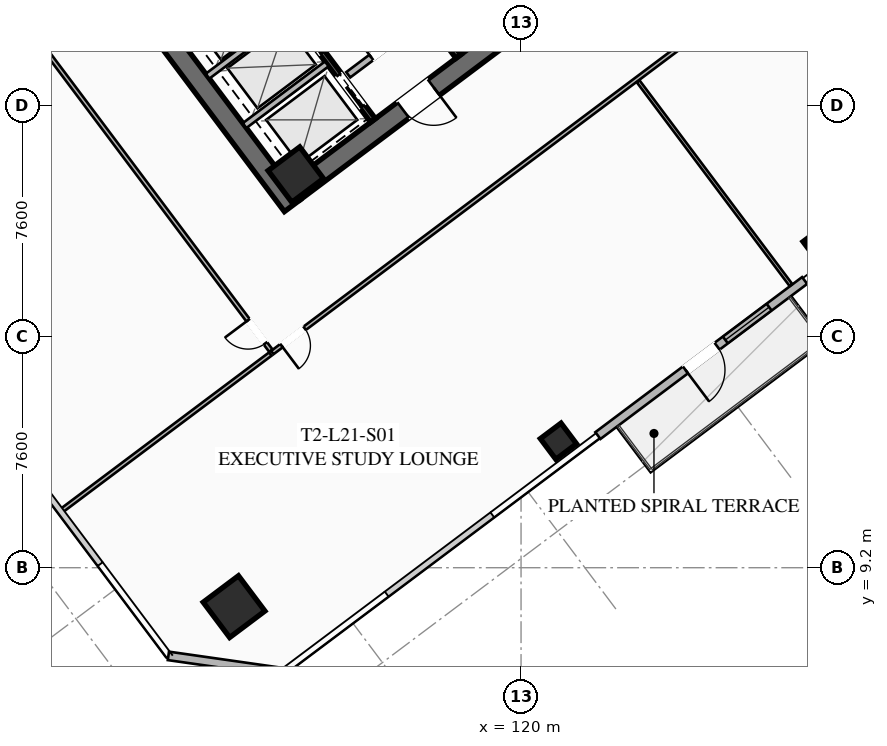
"""IFC4 building model, lengths in metres.
Left out: names, types, materials, properties, quantities, classifications, styles, units other than length and angle.
Written with IfcOpenShell. Run it as: python <this file> out.ifc"""

import sys

from ifc_helpers import new_model, si_unit, direction, frame, frame_2d, origin, origin_2d, place, context, subcontext, project, spatial, rectangle, hollow_rectangle, extrude, element, fill, save


model = new_model("IFC4")
c1 = context("Model", 3, precision=1e-05, world=origin(), true_north=direction((0.0, 1.0)))
c2 = subcontext(c1, "Body", "Model", "MODEL_VIEW")
j1 = project(units=[si_unit("LENGTHUNIT", "METRE"), si_unit("PLANEANGLEUNIT", "RADIAN")], contexts=[c1])
p1 = place(None, origin())
s1 = spatial("IfcSite", under=j1, at=p1, CompositionType="ELEMENT")
p2 = place(p1, origin())
s2 = spatial("IfcBuilding", under=s1, at=p2, CompositionType="ELEMENT")
p3 = place(p2, frame((0.0, 0.0, 81.4)))
s3 = spatial("IfcBuildingStorey", under=s2, at=p3, CompositionType="ELEMENT", Elevation=81.4)
p4 = place(p3, frame((112.476, 21.107, 0.0), z_axis=(0.0, 0.0, 1.0), x_axis=(-0.600005007985, 0.799996243986, 0.0)))
e1 = element("IfcWall", 1, at=p4, inside=s3, PredefinedType="SHEAR", context=c2, shape_type="SweptSolid", body=[
    extrude(rectangle(XDim=15.6, YDim=0.65, at=frame_2d((7.8, 0.0))), origin(), (0.0, 0.0, 1.0), 3.55),
])
p5 = place(p3, frame((124.429, 30.478, 0.0), z_axis=(0.0, 0.0, 1.0), x_axis=(-0.799998028465, -0.600002628705, 0.0)))
e2 = element("IfcWall", 2, at=p5, inside=s3, PredefinedType="SHEAR", context=c2, shape_type="SweptSolid", body=[
    extrude(rectangle(XDim=14.86, YDim=0.65, at=frame_2d((7.43, 0.0))), origin(), (0.0, 0.0, 1.0), 3.55),
])
p6 = place(p5, frame((9.13, 0.0, 0.0)))
e3 = element("IfcOpeningElement", 3, at=p6, cuts=e2, PredefinedType="OPENING", context=c2, shape_type="SweptSolid", body=[
    extrude(rectangle(XDim=1.25, YDim=2.25, at=frame_2d((0.625, 1.125))), frame((0.0, 0.335, 0.0), z_axis=(0.0, -1.0, 0.0), x_axis=(1.0, 0.0, 0.0)), (0.0, 0.0, 1.0), 0.67),
])
p7 = place(p5, frame((4.08, 0.0, 0.0)))
e4 = element("IfcOpeningElement", 4, at=p7, cuts=e2, PredefinedType="OPENING", context=c2, shape_type="SweptSolid", body=[
    extrude(rectangle(XDim=1.25, YDim=2.25, at=frame_2d((0.625, 1.125))), frame((0.0, 0.335, 0.0), z_axis=(0.0, -1.0, 0.0), x_axis=(1.0, 0.0, 0.0)), (0.0, 0.0, 1.0), 0.67),
])
p8 = place(p3, frame((112.59, 22.13, 0.0), z_axis=(0.0, 0.0, 1.0), x_axis=(0.799999996291, 0.600000004945, 0.0)))
e5 = element("IfcColumn", 5, at=p8, inside=s3, PredefinedType="COLUMN", context=c2, shape_type="SweptSolid", body=[
    extrude(hollow_rectangle(XDim=1.3, YDim=1.3, WallThickness=0.05, at=origin_2d()), origin(), (0.0, 0.0, 1.0), 3.35),
])
p9 = place(p3, frame((110.56, 7.92, 0.0), z_axis=(0.0, 0.0, 1.0), x_axis=(0.799999996291, 0.600000004945, 0.0)))
e6 = element("IfcColumn", 6, at=p9, inside=s3, PredefinedType="COLUMN", context=c2, shape_type="SweptSolid", body=[
    extrude(hollow_rectangle(XDim=1.45, YDim=1.45, WallThickness=0.055, at=origin_2d()), origin(), (0.0, 0.0, 1.0), 3.35),
])
for number, where, z_axis, x_axis in (
    (7, (121.23, 13.36, 0.0), (0.0, 0.0, 1.0), (0.8, 0.6, 0.0)),
    (8, (129.87, 19.84, 0.0), (0.0, 0.0, 1.0), (0.8, 0.6, 0.0)),
):
    element("IfcColumn", number, at=place(p3, frame(where, z_axis=z_axis, x_axis=x_axis)), inside=s3, PredefinedType="COLUMN", context=c2, shape_type="SweptSolid", body=[
        extrude(hollow_rectangle(XDim=0.85, YDim=0.85, WallThickness=0.035, at=origin_2d()), origin(), (0.0, 0.0, 1.0), 3.35),
    ])
p10 = place(p3, frame((129.328, 18.646, 0.0), z_axis=(0.0, 0.0, 1.0), x_axis=(-0.799986212866, -0.600018382406, 0.0)))
e9 = element("IfcWall", 9, at=p10, inside=s3, PredefinedType="SOLIDWALL", context=c2, shape_type="SweptSolid", body=[
    extrude(rectangle(XDim=8.5, YDim=0.28, at=frame_2d((4.25, 0.0))), origin(), (0.0, 0.0, 1.0), 3.35),
])
p11 = place(p10, frame((3.6, 0.0, 0.0)))
e10 = element("IfcOpeningElement", 10, at=p11, cuts=e9, PredefinedType="OPENING", context=c2, shape_type="SweptSolid", body=[
    extrude(rectangle(XDim=1.3, YDim=2.15, at=frame_2d((0.65, 1.075))), frame((0.0, 0.15, 0.0), z_axis=(0.0, -1.0, 0.0), x_axis=(1.0, 0.0, 0.0)), (0.0, 0.0, 1.0), 0.3),
])
p12 = place(p10, frame((1.46, 0.0, 0.85)))
e11 = element("IfcOpeningElement", 11, at=p12, cuts=e9, PredefinedType="OPENING", context=c2, shape_type="SweptSolid", body=[
    extrude(rectangle(XDim=1.8, YDim=1.92, at=frame_2d((0.9, 0.96))), frame((0.0, 0.15, 0.0), z_axis=(0.0, -1.0, 0.0), x_axis=(1.0, 0.0, 0.0)), (0.0, 0.0, 1.0), 0.3),
])
p13 = place(p3, frame((112.18, 5.76, 0.0), z_axis=(0.0, 0.0, 1.0), x_axis=(-0.989948214866, 0.141430307517, 0.0)))
e12 = element("IfcWall", 12, at=p13, inside=s3, PredefinedType="SOLIDWALL", context=c2, shape_type="SweptSolid", body=[
    extrude(rectangle(XDim=3.818, YDim=0.28, at=frame_2d((1.909, 0.0))), origin(), (0.0, 0.0, 1.0), 3.35),
])
p14 = place(p3, frame((117.938, 26.016, 0.0), z_axis=(0.0, 0.0, 1.0), x_axis=(-0.600005463273, 0.799995902516, 0.0)))
e13 = element("IfcWall", 13, at=p14, inside=s3, PredefinedType="SHEAR", context=c2, shape_type="SweptSolid", body=[
    extrude(rectangle(XDim=14.3, YDim=0.2, at=frame_2d((7.15, 0.0))), origin(), (0.0, 0.0, 1.0), 3.35),
])
p15 = place(p3, frame((114.316, 25.412, 0.0), z_axis=(0.0, 0.0, 1.0), x_axis=(0.800018601094, 0.59997519774, 0.0)))
e14 = element("IfcWall", 14, at=p15, inside=s3, PredefinedType="SOLIDWALL", context=c2, shape_type="SweptSolid", body=[
    extrude(rectangle(XDim=3.15, YDim=0.22, at=frame_2d((1.575, 0.0))), origin(), (0.0, 0.0, 1.0), 2.703),
])
p16 = place(p15, frame((0.95, 0.0, 0.0)))
e15 = element("IfcOpeningElement", 15, at=p16, cuts=e14, PredefinedType="OPENING", context=c2, shape_type="SweptSolid", body=[
    extrude(rectangle(XDim=1.25, YDim=2.25, at=frame_2d((0.625, 1.125))), frame((0.0, 0.12, 0.0), z_axis=(0.0, -1.0, 0.0), x_axis=(1.0, 0.0, 0.0)), (0.0, 0.0, 1.0), 0.24),
])
p17 = place(p3, frame((115.13, 23.91, 0.0), z_axis=(0.0, 0.0, 1.0), x_axis=(-0.599975393228, 0.800018454488, 0.0)))
e16 = element("IfcWall", 16, at=p17, inside=s3, PredefinedType="SHEAR", context=c2, shape_type="SweptSolid", body=[
    extrude(rectangle(XDim=6.35, YDim=0.2, at=frame_2d((3.175, 0.0))), origin(), (0.0, 0.0, 1.0), 3.35),
])
p18 = place(p17, frame((4.775, 0.0, 0.0)))
e17 = element("IfcOpeningElement", 17, at=p18, cuts=e16, PredefinedType="OPENING", context=c2, shape_type="SweptSolid", body=[
    extrude(rectangle(XDim=1.3, YDim=2.25, at=frame_2d((0.65, 1.125))), frame((0.0, 0.11, 0.0), z_axis=(0.0, -1.0, 0.0), x_axis=(1.0, 0.0, 0.0)), (0.0, 0.0, 1.0), 0.22),
])
p19 = place(p17, frame((2.775, 0.0, 0.0)))
e18 = element("IfcOpeningElement", 18, at=p19, cuts=e16, PredefinedType="OPENING", context=c2, shape_type="SweptSolid", body=[
    extrude(rectangle(XDim=1.3, YDim=2.25, at=frame_2d((0.65, 1.125))), frame((0.0, 0.11, 0.0), z_axis=(0.0, -1.0, 0.0), x_axis=(1.0, 0.0, 0.0)), (0.0, 0.0, 1.0), 0.22),
])
p20 = place(p17, frame((0.575, 0.0, 0.0)))
e19 = element("IfcOpeningElement", 19, at=p20, cuts=e16, PredefinedType="OPENING", context=c2, shape_type="SweptSolid", body=[
    extrude(rectangle(XDim=1.3, YDim=2.25, at=frame_2d((0.65, 1.125))), frame((0.0, 0.11, 0.0), z_axis=(0.0, -1.0, 0.0), x_axis=(1.0, 0.0, 0.0)), (0.0, 0.0, 1.0), 0.22),
])
for number, where, z_axis, x_axis in (
    (20, (110.906, 23.742, 0.0), (0.0, 0.0, 1.0), (0.8, 0.6, 0.0)),
    (21, (109.688, 25.366, 0.0), (0.0, 0.0, 1.0), (0.8, 0.6, 0.0)),
):
    element("IfcWall", number, at=place(p3, frame(where, z_axis=z_axis, x_axis=x_axis)), inside=s3, PredefinedType="SOLIDWALL", context=c2, shape_type="SweptSolid", body=[
        extrude(rectangle(XDim=3.38, YDim=0.2, at=frame_2d((1.69, 0.0))), origin(), (0.0, 0.0, 1.0), 3.35),
    ])
p21 = place(p3, frame((134.402, 33.214, 0.0), z_axis=(0.0, 0.0, 1.0), x_axis=(-0.799995848831, -0.600005534853, 0.0)))
e22 = element("IfcWall", 22, at=p21, inside=s3, PredefinedType="PARTITIONING", context=c2, shape_type="SweptSolid", body=[
    extrude(rectangle(XDim=28.23, YDim=0.135, at=frame_2d((14.115, 0.0))), origin(), (0.0, 0.0, 1.0), 2.703),
])
p22 = place(p21, frame((26.9, 0.0, 0.0)))
e23 = element("IfcOpeningElement", 23, at=p22, cuts=e22, PredefinedType="OPENING", context=c2, shape_type="SweptSolid", body=[
    extrude(rectangle(XDim=0.95, YDim=2.05, at=frame_2d((0.475, 1.025))), frame((0.0, 0.077, 0.0), z_axis=(0.0, -1.0, 0.0), x_axis=(1.0, 0.0, 0.0)), (0.0, 0.0, 1.0), 0.155),
])
p23 = place(p21, frame((0.38, 0.0, 0.0)))
e24 = element("IfcOpeningElement", 24, at=p23, cuts=e22, PredefinedType="OPENING", context=c2, shape_type="SweptSolid", body=[
    extrude(rectangle(XDim=0.95, YDim=2.05, at=frame_2d((0.475, 1.025))), frame((0.0, 0.077, 0.0), z_axis=(0.0, -1.0, 0.0), x_axis=(1.0, 0.0, 0.0)), (0.0, 0.0, 1.0), 0.155),
])
p24 = place(p3, frame((128.878, 18.496, 0.0), z_axis=(0.0, 0.0, 1.0), x_axis=(-0.599995338474, 0.800003496123, 0.0)))
e25 = element("IfcWall", 25, at=p24, inside=s3, PredefinedType="PARTITIONING", context=c2, shape_type="SweptSolid", body=[
    extrude(rectangle(XDim=8.38, YDim=0.11, at=frame_2d((4.19, 0.0))), origin(), (0.0, 0.0, 1.0), 2.703),
])
p25 = place(p3, frame((111.77, 16.34, 0.0), z_axis=(0.0, 0.0, 1.0), x_axis=(-0.600003549523, 0.799997337845, 0.0)))
e26 = element("IfcWall", 26, at=p25, inside=s3, PredefinedType="PARTITIONING", context=c2, shape_type="SweptSolid", body=[
    extrude(rectangle(XDim=22.01, YDim=0.135, at=frame_2d((11.005, 0.0))), origin(), (0.0, 0.0, 1.0), 2.703),
])
p26 = place(p25, frame((0.3, 0.0, 0.0)))
e27 = element("IfcOpeningElement", 27, at=p26, cuts=e26, PredefinedType="OPENING", context=c2, shape_type="SweptSolid", body=[
    extrude(rectangle(XDim=0.95, YDim=2.05, at=frame_2d((0.475, 1.025))), frame((0.0, 0.077, 0.0), z_axis=(0.0, -1.0, 0.0), x_axis=(1.0, 0.0, 0.0)), (0.0, 0.0, 1.0), 0.155),
])
p27 = place(p3, frame((104.858, 11.056, 0.0), z_axis=(0.0, 0.0, 1.0), x_axis=(0.799993202584, 0.600009063115, 0.0)))
e28 = element("IfcWall", 28, at=p27, inside=s3, PredefinedType="PARTITIONING", context=c2, shape_type="SweptSolid", body=[
    extrude(rectangle(XDim=8.62, YDim=0.135, at=frame_2d((4.31, 0.0))), origin(), (0.0, 0.0, 1.0), 2.703),
])
p28 = place(p11, origin())
e29 = element("IfcDoor", 29, at=p28, inside=s3, OperationType="SINGLE_SWING_RIGHT", PredefinedType="DOOR", context=c2, shape_type="SweptSolid", body=[
    extrude(rectangle(XDim=1.3, YDim=2.15, at=frame_2d((0.65, 1.075))), frame((0.0, 0.025, 0.0), z_axis=(0.0, -1.0, 0.0), x_axis=(1.0, 0.0, 0.0)), (0.0, 0.0, 1.0), 0.05),
])
fill(e10, e29)
p29 = place(p12, origin())
e30 = element("IfcWindow", 30, at=p29, inside=s3, PartitioningType="SINGLE_PANEL", PredefinedType="WINDOW", context=c2, shape_type="SweptSolid", body=[
    extrude(rectangle(XDim=1.8, YDim=1.92, at=frame_2d((0.9, 0.96))), frame((0.0, 0.03, 0.0), z_axis=(0.0, -1.0, 0.0), x_axis=(1.0, 0.0, 0.0)), (0.0, 0.0, 1.0), 0.06),
])
fill(e11, e30)
p30 = place(p6, origin())
e31 = element("IfcDoor", 31, at=p30, inside=s3, OperationType="SINGLE_SWING_LEFT", PredefinedType="DOOR", context=c2, shape_type="SweptSolid", body=[
    extrude(rectangle(XDim=1.25, YDim=2.25, at=frame_2d((0.625, 1.125))), frame((0.0, 0.025, 0.0), z_axis=(0.0, -1.0, 0.0), x_axis=(1.0, 0.0, 0.0)), (0.0, 0.0, 1.0), 0.05),
])
fill(e3, e31)
p31 = place(p16, origin())
e32 = element("IfcDoor", 32, at=p31, inside=s3, OperationType="SINGLE_SWING_LEFT", PredefinedType="DOOR", context=c2, shape_type="SweptSolid", body=[
    extrude(rectangle(XDim=1.25, YDim=2.25, at=frame_2d((0.625, 1.125))), frame((0.0, 0.025, 0.0), z_axis=(0.0, -1.0, 0.0), x_axis=(1.0, 0.0, 0.0)), (0.0, 0.0, 1.0), 0.05),
])
fill(e15, e32)
p32 = place(p22, origin())
e33 = element("IfcDoor", 33, at=p32, inside=s3, OperationType="SINGLE_SWING_RIGHT", PredefinedType="DOOR", context=c2, shape_type="SweptSolid", body=[
    extrude(rectangle(XDim=0.95, YDim=2.05, at=frame_2d((0.475, 1.025))), frame((0.0, 0.025, 0.0), z_axis=(0.0, -1.0, 0.0), x_axis=(1.0, 0.0, 0.0)), (0.0, 0.0, 1.0), 0.05),
])
fill(e23, e33)
p33 = place(p26, origin())
e34 = element("IfcDoor", 34, at=p33, inside=s3, OperationType="SINGLE_SWING_RIGHT", PredefinedType="DOOR", context=c2, shape_type="SweptSolid", body=[
    extrude(rectangle(XDim=0.95, YDim=2.05, at=frame_2d((0.475, 1.025))), frame((0.0, 0.025, 0.0), z_axis=(0.0, -1.0, 0.0), x_axis=(1.0, 0.0, 0.0)), (0.0, 0.0, 1.0), 0.05),
])
fill(e27, e34)
p34 = place(p19, origin())
e35 = element("IfcDoor", 35, at=p34, inside=s3, OperationType="SLIDING_TO_LEFT", PredefinedType="DOOR", context=c2, shape_type="SweptSolid", body=[
    extrude(rectangle(XDim=1.3, YDim=2.25, at=frame_2d((0.65, 1.125))), frame((0.0, 0.025, 0.0), z_axis=(0.0, -1.0, 0.0), x_axis=(1.0, 0.0, 0.0)), (0.0, 0.0, 1.0), 0.05),
])
fill(e18, e35)
p35 = place(p20, origin())
e36 = element("IfcDoor", 36, at=p35, inside=s3, OperationType="SLIDING_TO_LEFT", PredefinedType="DOOR", context=c2, shape_type="SweptSolid", body=[
    extrude(rectangle(XDim=1.3, YDim=2.25, at=frame_2d((0.65, 1.125))), frame((0.0, 0.025, 0.0), z_axis=(0.0, -1.0, 0.0), x_axis=(1.0, 0.0, 0.0)), (0.0, 0.0, 1.0), 0.05),
])
fill(e19, e36)
save(model, sys.argv[1])
